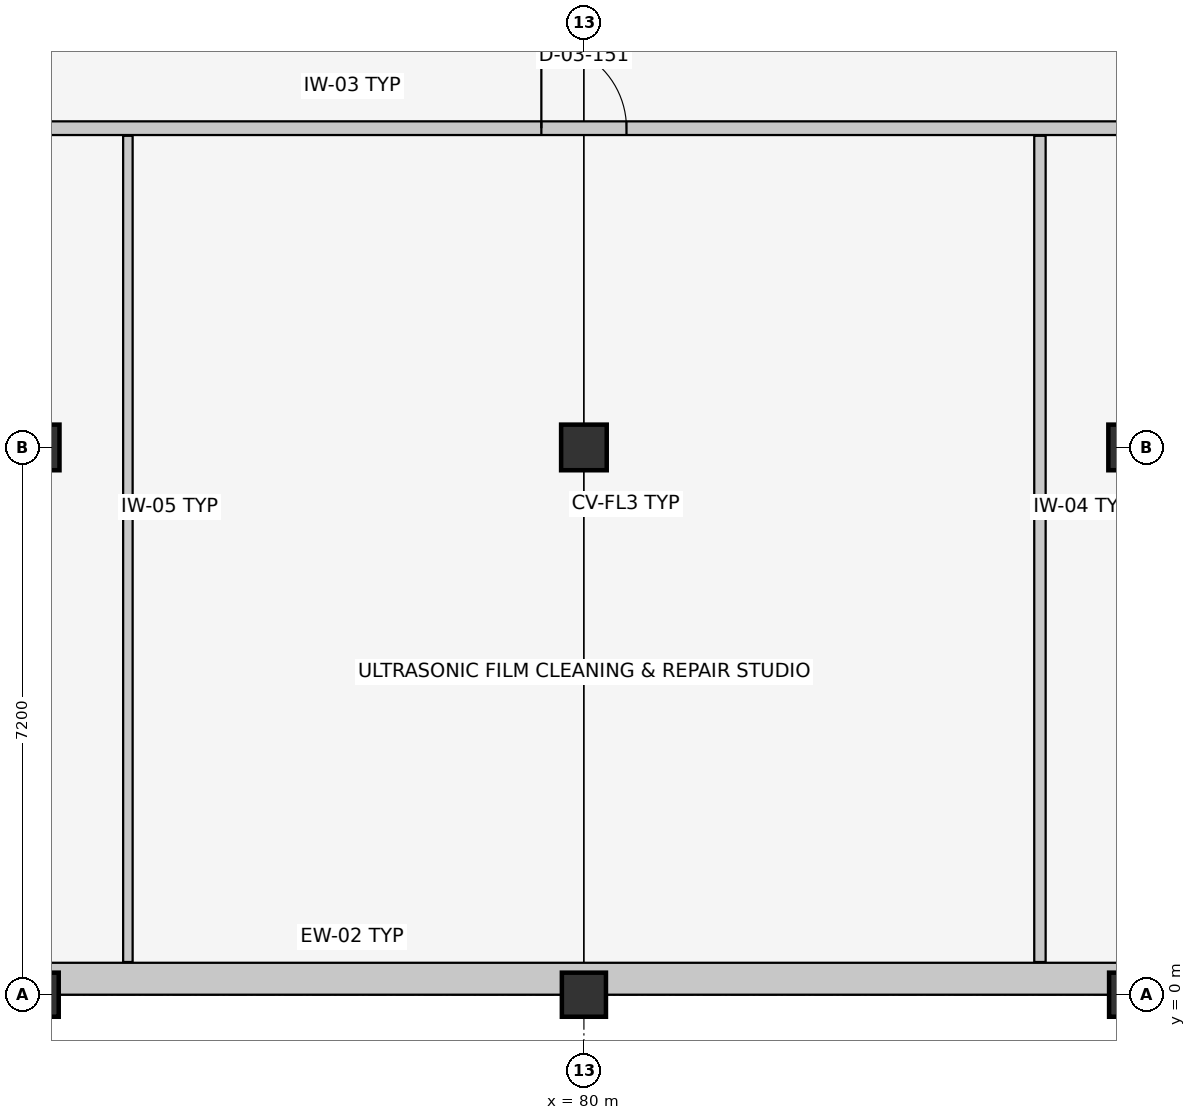
"""IFC4 building model, lengths in metres.
Left out: names, types, materials, properties, quantities, classifications, styles, units other than length and angle.
Written with IfcOpenShell. Run it as: python <this file> out.ifc"""

import sys

from ifc_helpers import new_model, si_unit, direction, frame, frame_2d, origin, origin_2d, place, context, subcontext, project, spatial, rectangle, extrude, element, fill, save


model = new_model("IFC4")
c1 = context("Model", 3, precision=1e-05, world=origin(), true_north=direction((0.0, 1.0)))
c2 = subcontext(c1, "Body", "Model", "MODEL_VIEW")
j1 = project(units=[si_unit("LENGTHUNIT", "METRE"), si_unit("PLANEANGLEUNIT", "RADIAN")], contexts=[c1])
p1 = place(None, origin())
s1 = spatial("IfcSite", under=j1, at=p1, CompositionType="ELEMENT")
p2 = place(p1, origin())
s2 = spatial("IfcBuilding", under=s1, at=p2, CompositionType="ELEMENT")
p3 = place(p2, frame((0.0, 0.0, 13.8)))
s3 = spatial("IfcBuildingStorey", under=s2, at=p3, CompositionType="ELEMENT", Elevation=13.8)
p4 = place(p3, frame((72.8, 0.0, 0.0), z_axis=(0.0, 0.0, 1.0), x_axis=(1.0, 0.0, 0.0)))
e1 = element("IfcColumn", 1, at=p4, inside=s3, PredefinedType="COLUMN", context=c2, shape_type="SweptSolid", body=[
    extrude(rectangle(XDim=0.58, YDim=0.58, at=origin_2d()), origin(), (0.0, 0.0, 1.0), 4.2),
])
p5 = place(p3, frame((72.8, 7.2, 0.0), z_axis=(0.0, 0.0, 1.0), x_axis=(1.0, 0.0, 0.0)))
e2 = element("IfcColumn", 2, at=p5, inside=s3, PredefinedType="COLUMN", context=c2, shape_type="SweptSolid", body=[
    extrude(rectangle(XDim=0.6, YDim=0.6, at=origin_2d()), origin(), (0.0, 0.0, 1.0), 4.2),
])
p6 = place(p3, frame((80.0, 0.0, 0.0), z_axis=(0.0, 0.0, 1.0), x_axis=(1.0, 0.0, 0.0)))
e3 = element("IfcColumn", 3, at=p6, inside=s3, PredefinedType="COLUMN", context=c2, shape_type="SweptSolid", body=[
    extrude(rectangle(XDim=0.58, YDim=0.58, at=origin_2d()), origin(), (0.0, 0.0, 1.0), 4.2),
])
p7 = place(p3, frame((80.0, 7.2, 0.0), z_axis=(0.0, 0.0, 1.0), x_axis=(1.0, 0.0, 0.0)))
e4 = element("IfcColumn", 4, at=p7, inside=s3, PredefinedType="COLUMN", context=c2, shape_type="SweptSolid", body=[
    extrude(rectangle(XDim=0.6, YDim=0.6, at=origin_2d()), origin(), (0.0, 0.0, 1.0), 4.2),
])
p8 = place(p3, frame((87.2, 0.0, 0.0), z_axis=(0.0, 0.0, 1.0), x_axis=(1.0, 0.0, 0.0)))
e5 = element("IfcColumn", 5, at=p8, inside=s3, PredefinedType="COLUMN", context=c2, shape_type="SweptSolid", body=[
    extrude(rectangle(XDim=0.58, YDim=0.58, at=origin_2d()), origin(), (0.0, 0.0, 1.0), 4.2),
])
p9 = place(p3, frame((87.2, 7.2, 0.0), z_axis=(0.0, 0.0, 1.0), x_axis=(1.0, 0.0, 0.0)))
e6 = element("IfcColumn", 6, at=p9, inside=s3, PredefinedType="COLUMN", context=c2, shape_type="SweptSolid", body=[
    extrude(rectangle(XDim=0.6, YDim=0.6, at=origin_2d()), origin(), (0.0, 0.0, 1.0), 4.2),
])
p10 = place(p3, frame((94.4, 0.21, 0.0), z_axis=(0.0, 0.0, 1.0), x_axis=(-1.0, 0.0, 0.0)))
e7 = element("IfcWall", 7, at=p10, inside=s3, PredefinedType="SOLIDWALL", context=c2, shape_type="SweptSolid", body=[
    extrude(rectangle(XDim=36.0, YDim=0.42, at=frame_2d((18.0, 0.0))), origin(), (0.0, 0.0, 1.0), 3.175),
])
p11 = place(p3, frame((58.83, 11.4, 0.0), z_axis=(0.0, 0.0, 1.0), x_axis=(1.0, 0.0, 0.0)))
e8 = element("IfcWall", 8, at=p11, inside=s3, PredefinedType="PARTITIONING", context=c2, shape_type="SweptSolid", body=[
    extrude(rectangle(XDim=35.14, YDim=0.18, at=frame_2d((17.57, 0.0))), origin(), (0.0, 0.0, 1.0), 3.88),
])
p12 = place(p11, frame((6.995, 0.0, 0.0)))
e9 = element("IfcOpeningElement", 9, at=p12, cuts=e8, PredefinedType="OPENING", context=c2, shape_type="SweptSolid", body=[
    extrude(rectangle(XDim=1.18, YDim=2.2, at=frame_2d((0.59, 1.1))), frame((0.0, 0.102, 0.0), z_axis=(0.0, -1.0, 0.0), x_axis=(1.0, 0.0, 0.0)), (0.0, 0.0, 1.0), 0.204),
])
p13 = place(p11, frame((20.61, 0.0, 0.0)))
e10 = element("IfcOpeningElement", 10, at=p13, cuts=e8, PredefinedType="OPENING", context=c2, shape_type="SweptSolid", body=[
    extrude(rectangle(XDim=1.12, YDim=2.15, at=frame_2d((0.56, 1.075))), frame((0.0, 0.102, 0.0), z_axis=(0.0, -1.0, 0.0), x_axis=(1.0, 0.0, 0.0)), (0.0, 0.0, 1.0), 0.204),
])
p14 = place(p11, frame((30.475, 0.0, 0.0)))
e11 = element("IfcOpeningElement", 11, at=p14, cuts=e8, PredefinedType="OPENING", context=c2, shape_type="SweptSolid", body=[
    extrude(rectangle(XDim=1.36, YDim=2.2, at=frame_2d((0.68, 1.1))), frame((0.0, 0.102, 0.0), z_axis=(0.0, -1.0, 0.0), x_axis=(1.0, 0.0, 0.0)), (0.0, 0.0, 1.0), 0.204),
])
p15 = place(p3, frame((74.0, 0.43, 0.0), z_axis=(0.0, 0.0, 1.0), x_axis=(0.0, 1.0, 0.0)))
e12 = element("IfcWall", 12, at=p15, inside=s3, PredefinedType="PARTITIONING", context=c2, shape_type="SweptSolid", body=[
    extrude(rectangle(XDim=10.87, YDim=0.125, at=frame_2d((5.435, 0.0))), origin(), (0.0, 0.0, 1.0), 3.88),
])
p16 = place(p3, frame((86.0, 0.43, 0.0), z_axis=(0.0, 0.0, 1.0), x_axis=(0.0, 1.0, 0.0)))
e13 = element("IfcWall", 13, at=p16, inside=s3, PredefinedType="PARTITIONING", context=c2, shape_type="SweptSolid", body=[
    extrude(rectangle(XDim=10.87, YDim=0.15, at=frame_2d((5.435, 0.0))), origin(), (0.0, 0.0, 1.0), 3.88),
])
p17 = place(p13, origin())
e14 = element("IfcDoor", 14, at=p17, inside=s3, OperationType="SINGLE_SWING_LEFT", PredefinedType="DOOR", context=c2, shape_type="SweptSolid", body=[
    extrude(rectangle(XDim=1.12, YDim=2.15, at=frame_2d((0.56, 1.075))), frame((0.0, 0.025, 0.0), z_axis=(0.0, -1.0, 0.0), x_axis=(1.0, 0.0, 0.0)), (0.0, 0.0, 1.0), 0.05),
])
fill(e10, e14)
save(model, sys.argv[1])
